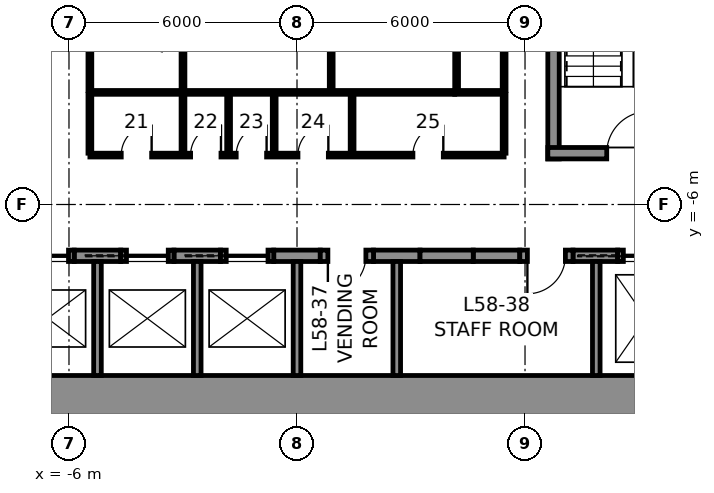
"""IFC4 building model, lengths in metres.
Left out: names, types, materials, properties, quantities, classifications, styles, units other than length and angle.
Written with IfcOpenShell. Run it as: python <this file> out.ifc"""

import sys

from ifc_helpers import new_model, si_unit, direction, frame, frame_2d, origin, place, context, subcontext, project, spatial, rectangle, extrude, element, fill, save


model = new_model("IFC4")
c1 = context("Model", 3, precision=1e-05, world=origin(), true_north=direction((0.0, 1.0)))
c2 = subcontext(c1, "Body", "Model", "MODEL_VIEW")
j1 = project(units=[si_unit("LENGTHUNIT", "METRE"), si_unit("PLANEANGLEUNIT", "RADIAN")], contexts=[c1])
p1 = place(None, origin())
s1 = spatial("IfcSite", under=j1, at=p1, CompositionType="ELEMENT")
p2 = place(p1, origin())
s2 = spatial("IfcBuilding", under=s1, at=p2, CompositionType="ELEMENT")
p3 = place(p2, frame((0.0, 0.0, 261.8)))
s3 = spatial("IfcBuildingStorey", under=s2, at=p3, CompositionType="ELEMENT", Elevation=261.8)
p4 = place(p3, frame((12.0, -11.25, 0.0), z_axis=(0.0, 0.0, 1.0), x_axis=(-1.0, 0.0, 0.0)))
e1 = element("IfcWall", 1, at=p4, inside=s3, PredefinedType="SHEAR", context=c2, shape_type="SweptSolid", body=[
    extrude(rectangle(XDim=24.0, YDim=1.5, at=frame_2d((12.0, 0.0))), origin(), (0.0, 0.0, 1.0), 4.0),
])
for number, where, z_axis, x_axis in (
    (2, (-5.863, -7.35, 0.0), (0.0, 0.0, 1.0), (1.0, 0.0, 0.0)),
    (3, (-3.238, -7.35, 0.0), (0.0, 0.0, 1.0), (1.0, 0.0, 0.0)),
    (4, (-0.613, -7.35, 0.0), (0.0, 0.0, 1.0), (1.0, 0.0, 0.0)),
    (5, (2.012, -7.35, 0.0), (0.0, 0.0, 1.0), (1.0, 0.0, 0.0)),
    (6, (4.637, -7.35, 0.0), (0.0, 0.0, 1.0), (1.0, 0.0, 0.0)),
):
    element("IfcWall", number, at=place(p3, frame(where, z_axis=z_axis, x_axis=x_axis)), inside=s3, PredefinedType="SHEAR", context=c2, shape_type="SweptSolid", body=[
        extrude(rectangle(XDim=1.225, YDim=0.3, at=frame_2d((0.613, 0.0))), origin(), (0.0, 0.0, 1.0), 4.0),
    ])
p5 = place(p3, frame((7.262, -7.35, 0.0), z_axis=(0.0, 0.0, 1.0), x_axis=(1.0, 0.0, 0.0)))
e7 = element("IfcWall", 7, at=p5, inside=s3, PredefinedType="SHEAR", context=c2, shape_type="SweptSolid", body=[
    extrude(rectangle(XDim=1.175, YDim=0.3, at=frame_2d((0.587, 0.0))), origin(), (0.0, 0.0, 1.0), 4.0),
])
p6 = place(p3, frame((-7.262, -7.35, 0.0), z_axis=(0.0, 0.0, 1.0), x_axis=(1.0, 0.0, 0.0)))
e8 = element("IfcWall", 8, at=p6, inside=s3, PredefinedType="PARTITIONING", context=c2, shape_type="SweptSolid", body=[
    extrude(rectangle(XDim=1.4, YDim=0.3, at=frame_2d((0.7, 0.0))), origin(), (0.0, 0.0, 1.0), 4.0),
])
p7 = place(p6, frame((0.15, 0.0, 0.0)))
e9 = element("IfcOpeningElement", 9, at=p7, cuts=e8, PredefinedType="OPENING", context=c2, shape_type="SweptSolid", body=[
    extrude(rectangle(XDim=1.1, YDim=2.3, at=frame_2d((0.55, 1.15))), frame((0.0, 0.16, 0.0), z_axis=(0.0, -1.0, 0.0), x_axis=(1.0, 0.0, 0.0)), (0.0, 0.0, 1.0), 0.32),
])
p8 = place(p3, frame((-4.637, -7.35, 0.0), z_axis=(0.0, 0.0, 1.0), x_axis=(1.0, 0.0, 0.0)))
e10 = element("IfcWall", 10, at=p8, inside=s3, PredefinedType="PARTITIONING", context=c2, shape_type="SweptSolid", body=[
    extrude(rectangle(XDim=1.4, YDim=0.3, at=frame_2d((0.7, 0.0))), origin(), (0.0, 0.0, 1.0), 4.0),
])
p9 = place(p8, frame((0.15, 0.0, 0.0)))
e11 = element("IfcOpeningElement", 11, at=p9, cuts=e10, PredefinedType="OPENING", context=c2, shape_type="SweptSolid", body=[
    extrude(rectangle(XDim=1.1, YDim=2.3, at=frame_2d((0.55, 1.15))), frame((0.0, 0.16, 0.0), z_axis=(0.0, -1.0, 0.0), x_axis=(1.0, 0.0, 0.0)), (0.0, 0.0, 1.0), 0.32),
])
p10 = place(p3, frame((-2.012, -7.35, 0.0), z_axis=(0.0, 0.0, 1.0), x_axis=(1.0, 0.0, 0.0)))
e12 = element("IfcWall", 12, at=p10, inside=s3, PredefinedType="PARTITIONING", context=c2, shape_type="SweptSolid", body=[
    extrude(rectangle(XDim=1.4, YDim=0.3, at=frame_2d((0.7, 0.0))), origin(), (0.0, 0.0, 1.0), 4.0),
])
p11 = place(p10, frame((0.15, 0.0, 0.0)))
e13 = element("IfcOpeningElement", 13, at=p11, cuts=e12, PredefinedType="OPENING", context=c2, shape_type="SweptSolid", body=[
    extrude(rectangle(XDim=1.1, YDim=2.3, at=frame_2d((0.55, 1.15))), frame((0.0, 0.16, 0.0), z_axis=(0.0, -1.0, 0.0), x_axis=(1.0, 0.0, 0.0)), (0.0, 0.0, 1.0), 0.32),
])
p12 = place(p3, frame((0.613, -7.35, 0.0), z_axis=(0.0, 0.0, 1.0), x_axis=(1.0, 0.0, 0.0)))
e14 = element("IfcWall", 14, at=p12, inside=s3, PredefinedType="PARTITIONING", context=c2, shape_type="SweptSolid", body=[
    extrude(rectangle(XDim=1.4, YDim=0.3, at=frame_2d((0.7, 0.0))), origin(), (0.0, 0.0, 1.0), 4.0),
])
p13 = place(p12, frame((0.2, 0.0, 0.0)))
e15 = element("IfcOpeningElement", 15, at=p13, cuts=e14, PredefinedType="OPENING", context=c2, shape_type="SweptSolid", body=[
    extrude(rectangle(XDim=1.0, YDim=2.3, at=frame_2d((0.5, 1.15))), frame((0.0, 0.16, 0.0), z_axis=(0.0, -1.0, 0.0), x_axis=(1.0, 0.0, 0.0)), (0.0, 0.0, 1.0), 0.32),
])
p14 = place(p3, frame((3.238, -7.35, 0.0), z_axis=(0.0, 0.0, 1.0), x_axis=(1.0, 0.0, 0.0)))
e16 = element("IfcWall", 16, at=p14, inside=s3, PredefinedType="PARTITIONING", context=c2, shape_type="SweptSolid", body=[
    extrude(rectangle(XDim=1.4, YDim=0.3, at=frame_2d((0.7, 0.0))), origin(), (0.0, 0.0, 1.0), 4.0),
])
p15 = place(p3, frame((5.863, -7.35, 0.0), z_axis=(0.0, 0.0, 1.0), x_axis=(1.0, 0.0, 0.0)))
e17 = element("IfcWall", 17, at=p15, inside=s3, PredefinedType="PARTITIONING", context=c2, shape_type="SweptSolid", body=[
    extrude(rectangle(XDim=1.4, YDim=0.3, at=frame_2d((0.7, 0.0))), origin(), (0.0, 0.0, 1.0), 4.0),
])
p16 = place(p15, frame((0.2, 0.0, 0.0)))
e18 = element("IfcOpeningElement", 18, at=p16, cuts=e17, PredefinedType="OPENING", context=c2, shape_type="SweptSolid", body=[
    extrude(rectangle(XDim=1.0, YDim=2.3, at=frame_2d((0.5, 1.15))), frame((0.0, 0.16, 0.0), z_axis=(0.0, -1.0, 0.0), x_axis=(1.0, 0.0, 0.0)), (0.0, 0.0, 1.0), 0.32),
])
p17 = place(p3, frame((8.438, -7.35, 0.0), z_axis=(0.0, 0.0, 1.0), x_axis=(1.0, 0.0, 0.0)))
e19 = element("IfcWall", 19, at=p17, inside=s3, PredefinedType="PARTITIONING", context=c2, shape_type="SweptSolid", body=[
    extrude(rectangle(XDim=1.5, YDim=0.3, at=frame_2d((0.75, 0.0))), origin(), (0.0, 0.0, 1.0), 4.0),
])
p18 = place(p17, frame((0.15, 0.0, 0.0)))
e20 = element("IfcOpeningElement", 20, at=p18, cuts=e19, PredefinedType="OPENING", context=c2, shape_type="SweptSolid", body=[
    extrude(rectangle(XDim=1.2, YDim=2.3, at=frame_2d((0.6, 1.15))), frame((0.0, 0.16, 0.0), z_axis=(0.0, -1.0, 0.0), x_axis=(1.0, 0.0, 0.0)), (0.0, 0.0, 1.0), 0.32),
])
for number, where, z_axis, x_axis in (
    (21, (-5.25, -10.5, 0.0), (0.0, 0.0, 1.0), (0.0, 1.0, 0.0)),
    (22, (-2.625, -10.5, 0.0), (0.0, 0.0, 1.0), (0.0, 1.0, 0.0)),
    (23, (0.0, -10.5, 0.0), (0.0, 0.0, 1.0), (0.0, 1.0, 0.0)),
    (24, (2.625, -10.5, 0.0), (0.0, 0.0, 1.0), (0.0, 1.0, 0.0)),
    (25, (7.875, -10.5, 0.0), (0.0, 0.0, 1.0), (0.0, 1.0, 0.0)),
):
    element("IfcWall", number, at=place(p3, frame(where, z_axis=z_axis, x_axis=x_axis)), inside=s3, PredefinedType="PARTITIONING", context=c2, shape_type="SweptSolid", body=[
        extrude(rectangle(XDim=3.0, YDim=0.2, at=frame_2d((1.5, 0.0))), origin(), (0.0, 0.0, 1.0), 4.0),
    ])
p19 = place(p3, frame((6.75, -4.8, 0.0), z_axis=(0.0, 0.0, 1.0), x_axis=(0.0, 1.0, 0.0)))
e26 = element("IfcWall", 26, at=p19, inside=s3, PredefinedType="SOLIDWALL", context=c2, shape_type="SweptSolid", body=[
    extrude(rectangle(XDim=9.6, YDim=0.3, at=frame_2d((4.8, 0.0))), origin(), (0.0, 0.0, 1.0), 3.75),
])
p20 = place(p3, frame((10.5, -4.65, 0.0), z_axis=(0.0, 0.0, 1.0), x_axis=(-1.0, 0.0, 0.0)))
e27 = element("IfcWall", 27, at=p20, inside=s3, PredefinedType="SOLIDWALL", context=c2, shape_type="SweptSolid", body=[
    extrude(rectangle(XDim=3.9, YDim=0.3, at=frame_2d((1.95, 0.0))), origin(), (0.0, 0.0, 1.0), 3.75),
])
p21 = place(p20, frame((1.25, 0.0, 0.0)))
e28 = element("IfcOpeningElement", 28, at=p21, cuts=e27, PredefinedType="OPENING", context=c2, shape_type="SweptSolid", body=[
    extrude(rectangle(XDim=1.1, YDim=2.3, at=frame_2d((0.55, 1.15))), frame((0.0, 0.16, 0.0), z_axis=(0.0, -1.0, 0.0), x_axis=(1.0, 0.0, 0.0)), (0.0, 0.0, 1.0), 0.32),
])
p22 = place(p3, frame((4.15, -3.05, 0.0), z_axis=(0.0, 0.0, 1.0), x_axis=(-1.0, 0.0, 0.0)))
e29 = element("IfcWall", 29, at=p22, inside=s3, PredefinedType="PARTITIONING", context=c2, shape_type="SweptSolid", body=[
    extrude(rectangle(XDim=9.6, YDim=0.1, at=frame_2d((4.8, 0.0))), origin(), (0.0, 0.0, 1.0), 3.75),
])
p23 = place(p3, frame((5.45, -3.05, 0.0), z_axis=(0.0, 0.0, 1.0), x_axis=(-1.0, 0.0, 0.0)))
e30 = element("IfcWall", 30, at=p23, inside=s3, PredefinedType="PARTITIONING", context=c2, shape_type="SweptSolid", body=[
    extrude(rectangle(XDim=1.3, YDim=0.1, at=frame_2d((0.65, 0.0))), origin(), (0.0, 0.0, 1.0), 3.75),
])
for number, where, z_axis, x_axis in (
    (31, (5.45, 3.0, 0.0), (0.0, 0.0, 1.0), (0.0, -1.0, 0.0)),
    (32, (-5.45, -3.0, 0.0), (0.0, 0.0, 1.0), (0.0, 1.0, 0.0)),
    (33, (-3.0, -3.0, 0.0), (0.0, 0.0, 1.0), (0.0, 1.0, 0.0)),
    (34, (0.9, -3.0, 0.0), (0.0, 0.0, 1.0), (0.0, 1.0, 0.0)),
    (35, (4.2, -3.0, 0.0), (0.0, 0.0, 1.0), (0.0, 1.0, 0.0)),
):
    element("IfcWall", number, at=place(p3, frame(where, z_axis=z_axis, x_axis=x_axis)), inside=s3, PredefinedType="PARTITIONING", context=c2, shape_type="SweptSolid", body=[
        extrude(rectangle(XDim=6.0, YDim=0.1, at=frame_2d((3.0, 0.0))), origin(), (0.0, 0.0, 1.0), 3.75),
    ])
p24 = place(p3, frame((5.45, -4.7, 0.0), z_axis=(0.0, 0.0, 1.0), x_axis=(-1.0, 0.0, 0.0)))
e36 = element("IfcWall", 36, at=p24, inside=s3, PredefinedType="PARTITIONING", context=c2, shape_type="SweptSolid", body=[
    extrude(rectangle(XDim=10.9, YDim=0.1, at=frame_2d((5.45, 0.0))), origin(), (0.0, 0.0, 1.0), 3.75),
])
p25 = place(p24, frame((9.275, 0.0, 0.0)))
e37 = element("IfcOpeningElement", 37, at=p25, cuts=e36, PredefinedType="OPENING", context=c2, shape_type="SweptSolid", body=[
    extrude(rectangle(XDim=0.8, YDim=2.3, at=frame_2d((0.4, 1.15))), frame((0.0, 0.06, 0.0), z_axis=(0.0, -1.0, 0.0), x_axis=(1.0, 0.0, 0.0)), (0.0, 0.0, 1.0), 0.12),
])
p26 = place(p24, frame((7.45, 0.0, 0.0)))
e38 = element("IfcOpeningElement", 38, at=p26, cuts=e36, PredefinedType="OPENING", context=c2, shape_type="SweptSolid", body=[
    extrude(rectangle(XDim=0.8, YDim=2.3, at=frame_2d((0.4, 1.15))), frame((0.0, 0.06, 0.0), z_axis=(0.0, -1.0, 0.0), x_axis=(1.0, 0.0, 0.0)), (0.0, 0.0, 1.0), 0.12),
])
p27 = place(p24, frame((6.25, 0.0, 0.0)))
e39 = element("IfcOpeningElement", 39, at=p27, cuts=e36, PredefinedType="OPENING", context=c2, shape_type="SweptSolid", body=[
    extrude(rectangle(XDim=0.8, YDim=2.3, at=frame_2d((0.4, 1.15))), frame((0.0, 0.06, 0.0), z_axis=(0.0, -1.0, 0.0), x_axis=(1.0, 0.0, 0.0)), (0.0, 0.0, 1.0), 0.12),
])
p28 = place(p24, frame((4.625, 0.0, 0.0)))
e40 = element("IfcOpeningElement", 40, at=p28, cuts=e36, PredefinedType="OPENING", context=c2, shape_type="SweptSolid", body=[
    extrude(rectangle(XDim=0.8, YDim=2.3, at=frame_2d((0.4, 1.15))), frame((0.0, 0.06, 0.0), z_axis=(0.0, -1.0, 0.0), x_axis=(1.0, 0.0, 0.0)), (0.0, 0.0, 1.0), 0.12),
])
p29 = place(p24, frame((1.6, 0.0, 0.0)))
e41 = element("IfcOpeningElement", 41, at=p29, cuts=e36, PredefinedType="OPENING", context=c2, shape_type="SweptSolid", body=[
    extrude(rectangle(XDim=0.8, YDim=2.3, at=frame_2d((0.4, 1.15))), frame((0.0, 0.06, 0.0), z_axis=(0.0, -1.0, 0.0), x_axis=(1.0, 0.0, 0.0)), (0.0, 0.0, 1.0), 0.12),
])
for number, where, z_axis, x_axis in (
    (42, (-5.45, -3.1, 0.0), (0.0, 0.0, 1.0), (0.0, -1.0, 0.0)),
    (43, (5.45, -3.1, 0.0), (0.0, 0.0, 1.0), (0.0, -1.0, 0.0)),
    (44, (-3.0, -3.1, 0.0), (0.0, 0.0, 1.0), (0.0, -1.0, 0.0)),
    (45, (-1.8, -3.1, 0.0), (0.0, 0.0, 1.0), (0.0, -1.0, 0.0)),
    (46, (-0.6, -3.1, 0.0), (0.0, 0.0, 1.0), (0.0, -1.0, 0.0)),
    (47, (1.45, -3.1, 0.0), (0.0, 0.0, 1.0), (0.0, -1.0, 0.0)),
):
    element("IfcWall", number, at=place(p3, frame(where, z_axis=z_axis, x_axis=x_axis)), inside=s3, PredefinedType="PARTITIONING", context=c2, shape_type="SweptSolid", body=[
        extrude(rectangle(XDim=1.55, YDim=0.1, at=frame_2d((0.775, 0.0))), origin(), (0.0, 0.0, 1.0), 3.75),
    ])
p30 = place(p21, frame((1.1, 0.0, 0.0), z_axis=(0.0, 0.0, 1.0), x_axis=(-1.0, 0.0, 0.0)))
e48 = element("IfcDoor", 48, at=p30, inside=s3, OperationType="SINGLE_SWING_RIGHT", PredefinedType="DOOR", context=c2, shape_type="SweptSolid", body=[
    extrude(rectangle(XDim=1.1, YDim=2.3, at=frame_2d((0.55, 1.15))), frame((0.0, 0.025, 0.0), z_axis=(0.0, -1.0, 0.0), x_axis=(1.0, 0.0, 0.0)), (0.0, 0.0, 1.0), 0.05),
])
fill(e28, e48)
p31 = place(p25, frame((0.8, 0.0, 0.0), z_axis=(0.0, 0.0, 1.0), x_axis=(-1.0, 0.0, 0.0)))
e49 = element("IfcDoor", 49, at=p31, inside=s3, OperationType="SINGLE_SWING_RIGHT", PredefinedType="DOOR", context=c2, shape_type="SweptSolid", body=[
    extrude(rectangle(XDim=0.8, YDim=2.3, at=frame_2d((0.4, 1.15))), frame((0.0, 0.025, 0.0), z_axis=(0.0, -1.0, 0.0), x_axis=(1.0, 0.0, 0.0)), (0.0, 0.0, 1.0), 0.05),
])
fill(e37, e49)
p32 = place(p26, frame((0.8, 0.0, 0.0), z_axis=(0.0, 0.0, 1.0), x_axis=(-1.0, 0.0, 0.0)))
e50 = element("IfcDoor", 50, at=p32, inside=s3, OperationType="SINGLE_SWING_RIGHT", PredefinedType="DOOR", context=c2, shape_type="SweptSolid", body=[
    extrude(rectangle(XDim=0.8, YDim=2.3, at=frame_2d((0.4, 1.15))), frame((0.0, 0.025, 0.0), z_axis=(0.0, -1.0, 0.0), x_axis=(1.0, 0.0, 0.0)), (0.0, 0.0, 1.0), 0.05),
])
fill(e38, e50)
p33 = place(p27, frame((0.8, 0.0, 0.0), z_axis=(0.0, 0.0, 1.0), x_axis=(-1.0, 0.0, 0.0)))
e51 = element("IfcDoor", 51, at=p33, inside=s3, OperationType="SINGLE_SWING_RIGHT", PredefinedType="DOOR", context=c2, shape_type="SweptSolid", body=[
    extrude(rectangle(XDim=0.8, YDim=2.3, at=frame_2d((0.4, 1.15))), frame((0.0, 0.025, 0.0), z_axis=(0.0, -1.0, 0.0), x_axis=(1.0, 0.0, 0.0)), (0.0, 0.0, 1.0), 0.05),
])
fill(e39, e51)
p34 = place(p28, frame((0.8, 0.0, 0.0), z_axis=(0.0, 0.0, 1.0), x_axis=(-1.0, 0.0, 0.0)))
e52 = element("IfcDoor", 52, at=p34, inside=s3, OperationType="SINGLE_SWING_RIGHT", PredefinedType="DOOR", context=c2, shape_type="SweptSolid", body=[
    extrude(rectangle(XDim=0.8, YDim=2.3, at=frame_2d((0.4, 1.15))), frame((0.0, 0.025, 0.0), z_axis=(0.0, -1.0, 0.0), x_axis=(1.0, 0.0, 0.0)), (0.0, 0.0, 1.0), 0.05),
])
fill(e40, e52)
p35 = place(p29, frame((0.8, 0.0, 0.0), z_axis=(0.0, 0.0, 1.0), x_axis=(-1.0, 0.0, 0.0)))
e53 = element("IfcDoor", 53, at=p35, inside=s3, OperationType="SINGLE_SWING_RIGHT", PredefinedType="DOOR", context=c2, shape_type="SweptSolid", body=[
    extrude(rectangle(XDim=0.8, YDim=2.3, at=frame_2d((0.4, 1.15))), frame((0.0, 0.025, 0.0), z_axis=(0.0, -1.0, 0.0), x_axis=(1.0, 0.0, 0.0)), (0.0, 0.0, 1.0), 0.05),
])
fill(e41, e53)
p36 = place(p13, frame((1.0, 0.0, 0.0), z_axis=(0.0, 0.0, 1.0), x_axis=(-1.0, 0.0, 0.0)))
e54 = element("IfcDoor", 54, at=p36, inside=s3, OperationType="SINGLE_SWING_RIGHT", PredefinedType="DOOR", context=c2, shape_type="SweptSolid", body=[
    extrude(rectangle(XDim=1.0, YDim=2.3, at=frame_2d((0.5, 1.15))), frame((0.0, 0.025, 0.0), z_axis=(0.0, -1.0, 0.0), x_axis=(1.0, 0.0, 0.0)), (0.0, 0.0, 1.0), 0.05),
])
fill(e15, e54)
p37 = place(p16, frame((1.0, 0.0, 0.0), z_axis=(0.0, 0.0, 1.0), x_axis=(-1.0, 0.0, 0.0)))
e55 = element("IfcDoor", 55, at=p37, inside=s3, OperationType="SINGLE_SWING_RIGHT", PredefinedType="DOOR", context=c2, shape_type="SweptSolid", body=[
    extrude(rectangle(XDim=1.0, YDim=2.3, at=frame_2d((0.5, 1.15))), frame((0.0, 0.025, 0.0), z_axis=(0.0, -1.0, 0.0), x_axis=(1.0, 0.0, 0.0)), (0.0, 0.0, 1.0), 0.05),
])
fill(e18, e55)
p38 = place(p18, origin())
e56 = element("IfcDoor", 56, at=p38, inside=s3, OperationType="SLIDING_TO_LEFT", PredefinedType="DOOR", context=c2, shape_type="SweptSolid", body=[
    extrude(rectangle(XDim=1.2, YDim=2.3, at=frame_2d((0.6, 1.15))), frame((0.0, 0.025, 0.0), z_axis=(0.0, -1.0, 0.0), x_axis=(1.0, 0.0, 0.0)), (0.0, 0.0, 1.0), 0.05),
])
fill(e20, e56)
p39 = place(p11, origin())
e57 = element("IfcDoor", 57, at=p39, inside=s3, OperationType="SLIDING_TO_LEFT", PredefinedType="DOOR", context=c2, shape_type="SweptSolid", body=[
    extrude(rectangle(XDim=1.1, YDim=2.3, at=frame_2d((0.55, 1.15))), frame((0.0, 0.025, 0.0), z_axis=(0.0, -1.0, 0.0), x_axis=(1.0, 0.0, 0.0)), (0.0, 0.0, 1.0), 0.05),
])
fill(e13, e57)
p40 = place(p9, origin())
e58 = element("IfcDoor", 58, at=p40, inside=s3, OperationType="SLIDING_TO_LEFT", PredefinedType="DOOR", context=c2, shape_type="SweptSolid", body=[
    extrude(rectangle(XDim=1.1, YDim=2.3, at=frame_2d((0.55, 1.15))), frame((0.0, 0.025, 0.0), z_axis=(0.0, -1.0, 0.0), x_axis=(1.0, 0.0, 0.0)), (0.0, 0.0, 1.0), 0.05),
])
fill(e11, e58)
p41 = place(p7, origin())
e59 = element("IfcDoor", 59, at=p41, inside=s3, OperationType="SLIDING_TO_LEFT", PredefinedType="DOOR", context=c2, shape_type="SweptSolid", body=[
    extrude(rectangle(XDim=1.1, YDim=2.3, at=frame_2d((0.55, 1.15))), frame((0.0, 0.025, 0.0), z_axis=(0.0, -1.0, 0.0), x_axis=(1.0, 0.0, 0.0)), (0.0, 0.0, 1.0), 0.05),
])
fill(e9, e59)
save(model, sys.argv[1])
